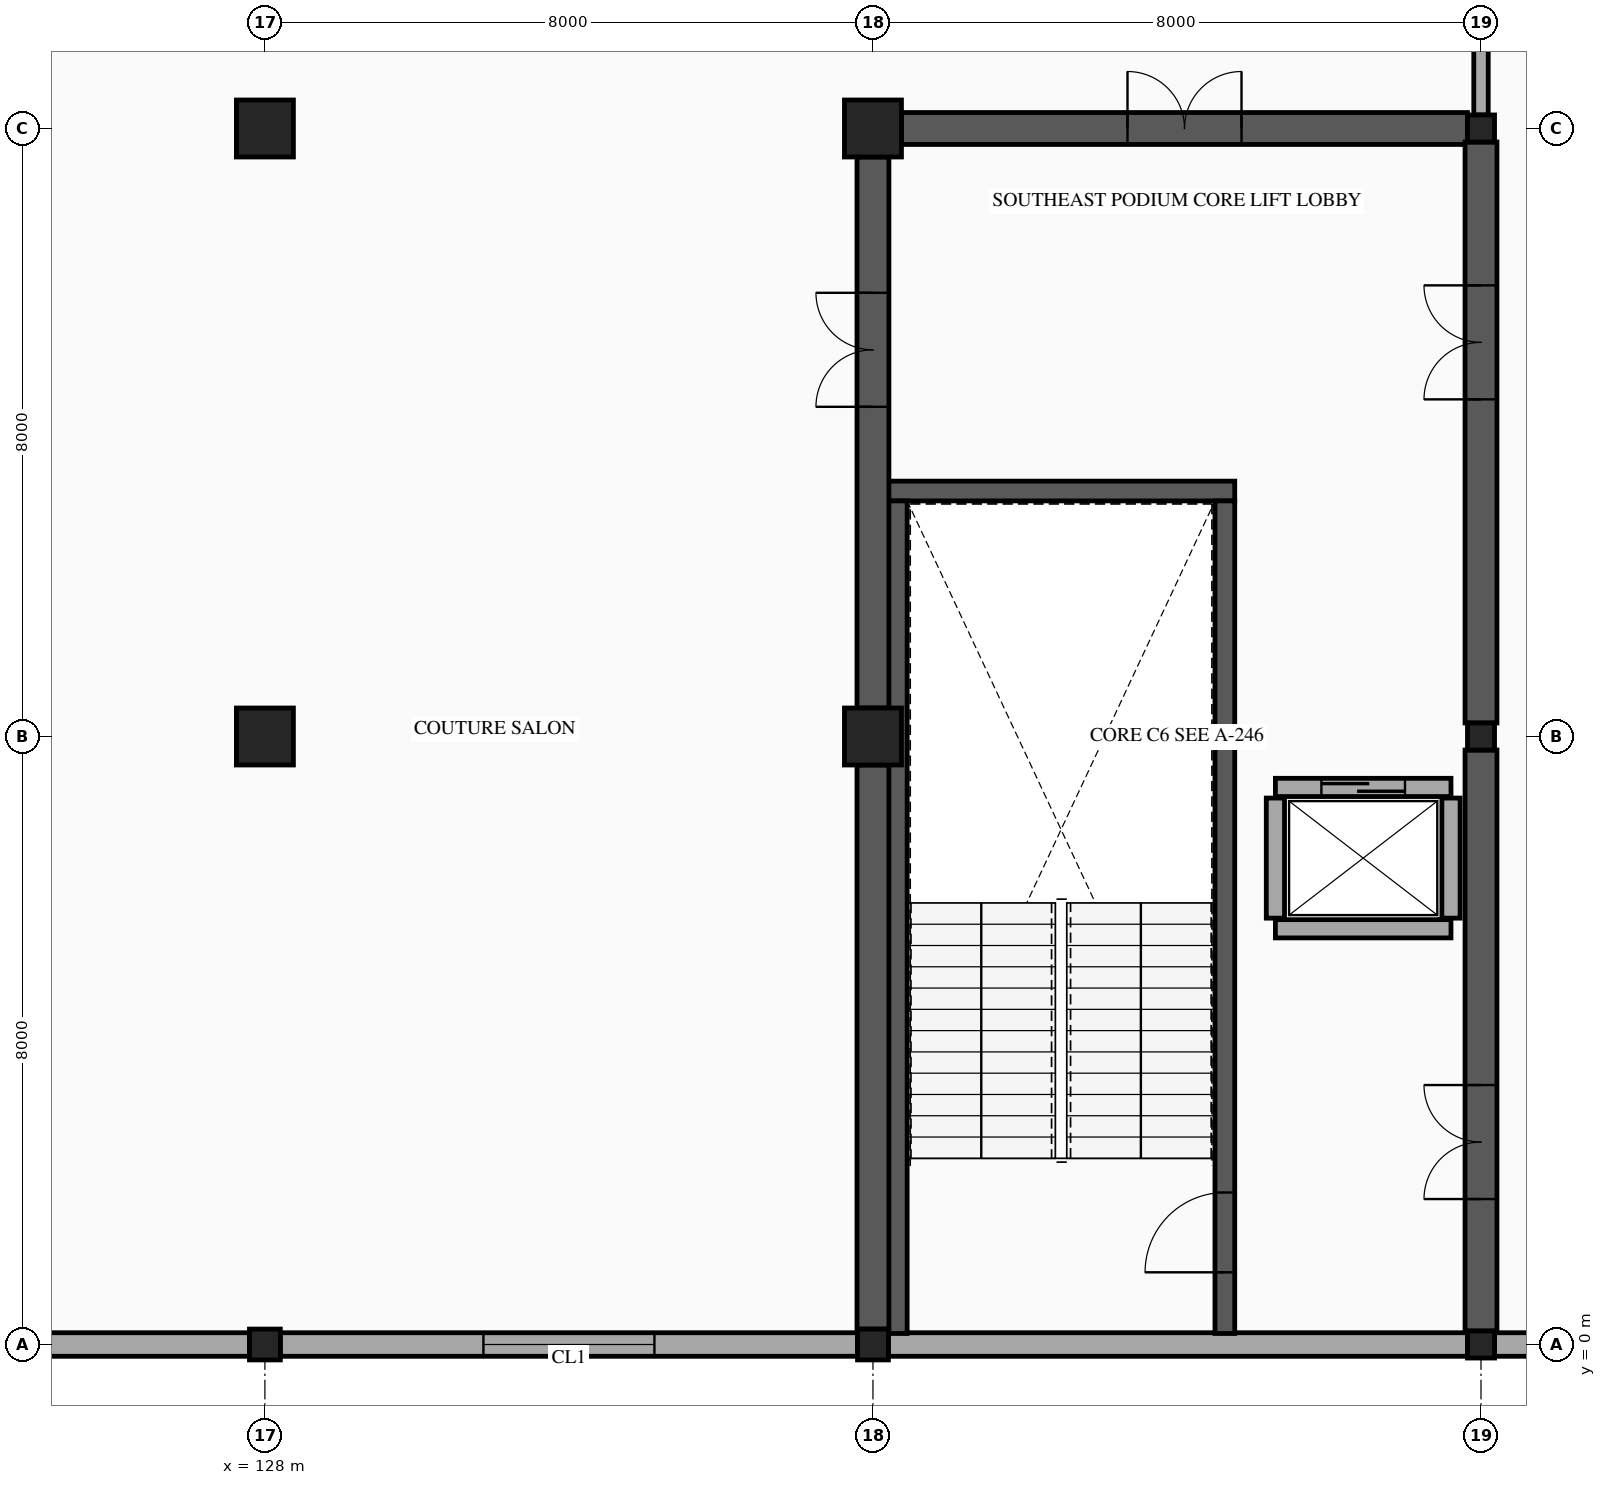
"""IFC4 building model, lengths in metres.
Left out: names, types, materials, properties, quantities, classifications, styles, units other than length and angle.
Written with IfcOpenShell. Run it as: python <this file> out.ifc"""

import sys

from ifc_helpers import new_model, si_unit, direction, frame, frame_2d, origin, origin_2d, place, context, subcontext, project, spatial, rectangle, hollow_rectangle, extrude, element, fill, save


model = new_model("IFC4")
c1 = context("Model", 3, precision=1e-05, world=origin(), true_north=direction((0.0, 1.0)))
c2 = subcontext(c1, "Body", "Model", "MODEL_VIEW")
j1 = project(units=[si_unit("LENGTHUNIT", "METRE"), si_unit("PLANEANGLEUNIT", "RADIAN")], contexts=[c1])
p1 = place(None, origin())
s1 = spatial("IfcSite", under=j1, at=p1, CompositionType="ELEMENT")
p2 = place(p1, origin())
s2 = spatial("IfcBuilding", under=s1, at=p2, CompositionType="ELEMENT")
p3 = place(p2, frame((0.0, 0.0, 10.4)))
s3 = spatial("IfcBuildingStorey", under=s2, at=p3, CompositionType="ELEMENT", Elevation=10.4)
p4 = place(p3, frame((128.0, 0.0, 0.0), z_axis=(0.0, 0.0, 1.0), x_axis=(1.0, 0.0, 0.0)))
e1 = element("IfcColumn", 1, at=p4, inside=s3, PredefinedType="COLUMN", context=c2, shape_type="SweptSolid", body=[
    extrude(hollow_rectangle(XDim=0.406, YDim=0.406, WallThickness=0.015, InnerFilletRadius=0.015, OuterFilletRadius=0.029, at=origin_2d()), origin(), (0.0, 0.0, 1.0), 4.5),
])
for number, where, z_axis, x_axis in (
    (2, (128.0, 8.0, 0.0), (0.0, 0.0, 1.0), (1.0, 0.0, 0.0)),
    (3, (128.0, 16.0, 0.0), (0.0, 0.0, 1.0), (1.0, 0.0, 0.0)),
):
    element("IfcColumn", number, at=place(p3, frame(where, z_axis=z_axis, x_axis=x_axis)), inside=s3, PredefinedType="COLUMN", context=c2, shape_type="SweptSolid", body=[
        extrude(rectangle(XDim=0.75, YDim=0.75, at=origin_2d()), origin(), (0.0, 0.0, 1.0), 4.5),
    ])
p5 = place(p3, frame((136.0, 0.0, 0.0), z_axis=(0.0, 0.0, 1.0), x_axis=(1.0, 0.0, 0.0)))
e4 = element("IfcColumn", 4, at=p5, inside=s3, PredefinedType="COLUMN", context=c2, shape_type="SweptSolid", body=[
    extrude(hollow_rectangle(XDim=0.406, YDim=0.406, WallThickness=0.015, InnerFilletRadius=0.015, OuterFilletRadius=0.029, at=origin_2d()), origin(), (0.0, 0.0, 1.0), 4.5),
])
for number, where, z_axis, x_axis in (
    (5, (136.0, 8.0, 0.0), (0.0, 0.0, 1.0), (1.0, 0.0, 0.0)),
    (6, (136.0, 16.0, 0.0), (0.0, 0.0, 1.0), (1.0, 0.0, 0.0)),
):
    element("IfcColumn", number, at=place(p3, frame(where, z_axis=z_axis, x_axis=x_axis)), inside=s3, PredefinedType="COLUMN", context=c2, shape_type="SweptSolid", body=[
        extrude(rectangle(XDim=0.75, YDim=0.75, at=origin_2d()), origin(), (0.0, 0.0, 1.0), 4.5),
    ])
for number, where, z_axis, x_axis in (
    (7, (144.0, 0.0, 0.0), (0.0, 0.0, 1.0), (1.0, 0.0, 0.0)),
    (8, (144.0, 8.0, 0.0), (0.0, 0.0, 1.0), (1.0, 0.0, 0.0)),
    (9, (144.0, 16.0, 0.0), (0.0, 0.0, 1.0), (1.0, 0.0, 0.0)),
):
    element("IfcColumn", number, at=place(p3, frame(where, z_axis=z_axis, x_axis=x_axis)), inside=s3, PredefinedType="COLUMN", context=c2, shape_type="SweptSolid", body=[
        extrude(hollow_rectangle(XDim=0.356, YDim=0.356, WallThickness=0.012, InnerFilletRadius=0.012, OuterFilletRadius=0.024, at=origin_2d()), origin(), (0.0, 0.0, 1.0), 4.5),
    ])
p6 = place(p3, frame((151.822, 0.0, 0.0), z_axis=(0.0, 0.0, 1.0), x_axis=(-1.0, 0.0, 0.0)))
e10 = element("IfcWall", 10, at=p6, inside=s3, PredefinedType="STANDARD", context=c2, shape_type="SweptSolid", body=[
    extrude(rectangle(XDim=7.644, YDim=0.31, at=frame_2d((3.822, 0.0))), origin(), (0.0, 0.0, 1.0), 3.48),
])
p7 = place(p6, frame((2.697, 0.0, 0.8)))
e11 = element("IfcOpeningElement", 11, at=p7, cuts=e10, PredefinedType="OPENING", context=c2, shape_type="SweptSolid", body=[
    extrude(rectangle(XDim=2.25, YDim=1.75, at=frame_2d((1.125, 0.875))), frame((0.0, 0.165, 0.0), z_axis=(0.0, -1.0, 0.0), x_axis=(1.0, 0.0, 0.0)), (0.0, 0.0, 1.0), 0.33),
])
p8 = place(p3, frame((143.822, 0.0, 0.0), z_axis=(0.0, 0.0, 1.0), x_axis=(-1.0, 0.0, 0.0)))
e12 = element("IfcWall", 12, at=p8, inside=s3, PredefinedType="STANDARD", context=c2, shape_type="SweptSolid", body=[
    extrude(rectangle(XDim=7.619, YDim=0.31, at=frame_2d((3.81, 0.0))), origin(), (0.0, 0.0, 1.0), 3.48),
])
p9 = place(p3, frame((135.797, 0.0, 0.0), z_axis=(0.0, 0.0, 1.0), x_axis=(-1.0, 0.0, 0.0)))
e13 = element("IfcWall", 13, at=p9, inside=s3, PredefinedType="STANDARD", context=c2, shape_type="SweptSolid", body=[
    extrude(rectangle(XDim=7.594, YDim=0.31, at=frame_2d((3.797, 0.0))), origin(), (0.0, 0.0, 1.0), 3.48),
])
p10 = place(p9, frame((2.672, 0.0, 0.8)))
e14 = element("IfcOpeningElement", 14, at=p10, cuts=e13, PredefinedType="OPENING", context=c2, shape_type="SweptSolid", body=[
    extrude(rectangle(XDim=2.25, YDim=1.75, at=frame_2d((1.125, 0.875))), frame((0.0, 0.165, 0.0), z_axis=(0.0, -1.0, 0.0), x_axis=(1.0, 0.0, 0.0)), (0.0, 0.0, 1.0), 0.33),
])
p11 = place(p3, frame((127.797, 0.0, 0.0), z_axis=(0.0, 0.0, 1.0), x_axis=(-1.0, 0.0, 0.0)))
e15 = element("IfcWall", 15, at=p11, inside=s3, PredefinedType="STANDARD", context=c2, shape_type="SweptSolid", body=[
    extrude(rectangle(XDim=7.594, YDim=0.31, at=frame_2d((3.797, 0.0))), origin(), (0.0, 0.0, 1.0), 3.48),
])
p12 = place(p3, frame((136.19, 11.23, 0.0), z_axis=(0.0, 0.0, 1.0), x_axis=(1.0, 0.0, 0.0)))
e16 = element("IfcWall", 16, at=p12, inside=s3, PredefinedType="SHEAR", context=c2, shape_type="SweptSolid", body=[
    extrude(rectangle(XDim=4.57, YDim=0.26, at=frame_2d((2.285, 0.0))), origin(), (0.0, 0.0, 1.0), 4.28),
])
p13 = place(p3, frame((136.32, 0.145, 0.0), z_axis=(0.0, 0.0, 1.0), x_axis=(0.0, 1.0, 0.0)))
e17 = element("IfcWall", 17, at=p13, inside=s3, PredefinedType="SHEAR", context=c2, shape_type="SweptSolid", body=[
    extrude(rectangle(XDim=10.955, YDim=0.26, at=frame_2d((5.478, 0.0))), origin(), (0.0, 0.0, 1.0), 4.28),
])
p14 = place(p3, frame((140.63, 0.145, 0.0), z_axis=(0.0, 0.0, 1.0), x_axis=(0.0, 1.0, 0.0)))
e18 = element("IfcWall", 18, at=p14, inside=s3, PredefinedType="SHEAR", context=c2, shape_type="SweptSolid", body=[
    extrude(rectangle(XDim=10.955, YDim=0.26, at=frame_2d((5.478, 0.0))), origin(), (0.0, 0.0, 1.0), 4.28),
])
p15 = place(p14, frame((0.805, 0.0, 0.0)))
e19 = element("IfcOpeningElement", 19, at=p15, cuts=e18, PredefinedType="OPENING", context=c2, shape_type="SweptSolid", body=[
    extrude(rectangle(XDim=1.05, YDim=2.15, at=frame_2d((0.525, 1.075))), frame((0.0, 0.14, 0.0), z_axis=(0.0, -1.0, 0.0), x_axis=(1.0, 0.0, 0.0)), (0.0, 0.0, 1.0), 0.28),
])
p16 = place(p3, frame((136.375, 16.0, 0.0), z_axis=(0.0, 0.0, 1.0), x_axis=(1.0, 0.0, 0.0)))
e20 = element("IfcWall", 20, at=p16, inside=s3, PredefinedType="SHEAR", context=c2, shape_type="SweptSolid", body=[
    extrude(rectangle(XDim=7.447, YDim=0.42, at=frame_2d((3.724, 0.0))), origin(), (0.0, 0.0, 1.0), 4.28),
])
p17 = place(p16, frame((2.974, 0.0, 0.0)))
e21 = element("IfcOpeningElement", 21, at=p17, cuts=e20, PredefinedType="OPENING", context=c2, shape_type="SweptSolid", body=[
    extrude(rectangle(XDim=1.5, YDim=2.15, at=frame_2d((0.75, 1.075))), frame((0.0, 0.22, 0.0), z_axis=(0.0, -1.0, 0.0), x_axis=(1.0, 0.0, 0.0)), (0.0, 0.0, 1.0), 0.44),
])
p18 = place(p3, frame((136.0, 0.203, 0.0), z_axis=(0.0, 0.0, 1.0), x_axis=(0.0, 1.0, 0.0)))
e22 = element("IfcWall", 22, at=p18, inside=s3, PredefinedType="SHEAR", context=c2, shape_type="SweptSolid", body=[
    extrude(rectangle(XDim=7.422, YDim=0.42, at=frame_2d((3.711, 0.0))), origin(), (0.0, 0.0, 1.0), 4.28),
])
p19 = place(p3, frame((136.0, 8.375, 0.0), z_axis=(0.0, 0.0, 1.0), x_axis=(0.0, 1.0, 0.0)))
e23 = element("IfcWall", 23, at=p19, inside=s3, PredefinedType="SHEAR", context=c2, shape_type="SweptSolid", body=[
    extrude(rectangle(XDim=7.25, YDim=0.42, at=frame_2d((3.625, 0.0))), origin(), (0.0, 0.0, 1.0), 4.28),
])
p20 = place(p19, frame((3.963, 0.0, 0.0)))
e24 = element("IfcOpeningElement", 24, at=p20, cuts=e23, PredefinedType="OPENING", context=c2, shape_type="SweptSolid", body=[
    extrude(rectangle(XDim=1.5, YDim=2.15, at=frame_2d((0.75, 1.075))), frame((0.0, 0.22, 0.0), z_axis=(0.0, -1.0, 0.0), x_axis=(1.0, 0.0, 0.0)), (0.0, 0.0, 1.0), 0.44),
])
p21 = place(p3, frame((144.0, 0.178, 0.0), z_axis=(0.0, 0.0, 1.0), x_axis=(0.0, 1.0, 0.0)))
e25 = element("IfcWall", 25, at=p21, inside=s3, PredefinedType="SHEAR", context=c2, shape_type="SweptSolid", body=[
    extrude(rectangle(XDim=7.644, YDim=0.42, at=frame_2d((3.822, 0.0))), origin(), (0.0, 0.0, 1.0), 4.28),
])
p22 = place(p21, frame((1.736, 0.0, 0.0)))
e26 = element("IfcOpeningElement", 26, at=p22, cuts=e25, PredefinedType="OPENING", context=c2, shape_type="SweptSolid", body=[
    extrude(rectangle(XDim=1.5, YDim=2.15, at=frame_2d((0.75, 1.075))), frame((0.0, 0.22, 0.0), z_axis=(0.0, -1.0, 0.0), x_axis=(1.0, 0.0, 0.0)), (0.0, 0.0, 1.0), 0.44),
])
p23 = place(p3, frame((144.0, 8.178, 0.0), z_axis=(0.0, 0.0, 1.0), x_axis=(0.0, 1.0, 0.0)))
e27 = element("IfcWall", 27, at=p23, inside=s3, PredefinedType="SHEAR", context=c2, shape_type="SweptSolid", body=[
    extrude(rectangle(XDim=7.644, YDim=0.42, at=frame_2d((3.822, 0.0))), origin(), (0.0, 0.0, 1.0), 4.28),
])
p24 = place(p23, frame((4.258, 0.0, 0.0)))
e28 = element("IfcOpeningElement", 28, at=p24, cuts=e27, PredefinedType="OPENING", context=c2, shape_type="SweptSolid", body=[
    extrude(rectangle(XDim=1.5, YDim=2.15, at=frame_2d((0.75, 1.075))), frame((0.0, 0.22, 0.0), z_axis=(0.0, -1.0, 0.0), x_axis=(1.0, 0.0, 0.0)), (0.0, 0.0, 1.0), 0.44),
])
p25 = place(p3, frame((141.295, 7.33, 0.0), z_axis=(0.0, 0.0, 1.0), x_axis=(1.0, 0.0, 0.0)))
e29 = element("IfcWall", 29, at=p25, inside=s3, PredefinedType="PARTITIONING", context=c2, shape_type="SweptSolid", body=[
    extrude(rectangle(XDim=2.31, YDim=0.24, at=frame_2d((1.155, 0.0))), origin(), (0.0, 0.0, 1.0), 4.28),
])
p26 = place(p25, frame((0.605, 0.0, 0.0)))
e30 = element("IfcOpeningElement", 30, at=p26, cuts=e29, PredefinedType="OPENING", context=c2, shape_type="SweptSolid", body=[
    extrude(rectangle(XDim=1.1, YDim=2.15, at=frame_2d((0.55, 1.075))), frame((0.0, 0.13, 0.0), z_axis=(0.0, -1.0, 0.0), x_axis=(1.0, 0.0, 0.0)), (0.0, 0.0, 1.0), 0.26),
])
p27 = place(p3, frame((141.295, 5.47, 0.0), z_axis=(0.0, 0.0, 1.0), x_axis=(1.0, 0.0, 0.0)))
e31 = element("IfcWall", 31, at=p27, inside=s3, PredefinedType="PARTITIONING", context=c2, shape_type="SweptSolid", body=[
    extrude(rectangle(XDim=2.31, YDim=0.24, at=frame_2d((1.155, 0.0))), origin(), (0.0, 0.0, 1.0), 4.28),
])
for number, where, z_axis, x_axis in (
    (32, (141.295, 5.61, 0.0), (0.0, 0.0, 1.0), (0.0, 1.0, 0.0)),
    (33, (143.605, 5.61, 0.0), (0.0, 0.0, 1.0), (0.0, 1.0, 0.0)),
):
    element("IfcWall", number, at=place(p3, frame(where, z_axis=z_axis, x_axis=x_axis)), inside=s3, PredefinedType="PARTITIONING", context=c2, shape_type="SweptSolid", body=[
        extrude(rectangle(XDim=1.58, YDim=0.24, at=frame_2d((0.79, 0.0))), origin(), (0.0, 0.0, 1.0), 4.28),
    ])
p28 = place(p3, frame((144.0, 16.178, 0.0), z_axis=(0.0, 0.0, 1.0), x_axis=(0.0, 1.0, 0.0)))
e34 = element("IfcWall", 34, at=p28, inside=s3, PredefinedType="PARTITIONING", context=c2, shape_type="SweptSolid", body=[
    extrude(rectangle(XDim=15.672, YDim=0.19, at=frame_2d((7.836, 0.0))), origin(), (0.0, 0.0, 1.0), 3.48),
])
p29 = place(p28, frame((10.828, 0.0, 0.0)))
e35 = element("IfcOpeningElement", 35, at=p29, cuts=e34, PredefinedType="OPENING", context=c2, shape_type="SweptSolid", body=[
    extrude(rectangle(XDim=1.8, YDim=2.25, at=frame_2d((0.9, 1.125))), frame((0.0, 0.105, 0.0), z_axis=(0.0, -1.0, 0.0), x_axis=(1.0, 0.0, 0.0)), (0.0, 0.0, 1.0), 0.21),
])
p30 = place(p10, origin())
e36 = element("IfcWindow", 36, at=p30, inside=s3, PartitioningType="DOUBLE_PANEL_VERTICAL", PredefinedType="WINDOW", context=c2, shape_type="SweptSolid", body=[
    extrude(rectangle(XDim=2.25, YDim=1.75, at=frame_2d((1.125, 0.875))), frame((0.0, 0.03, 0.0), z_axis=(0.0, -1.0, 0.0), x_axis=(1.0, 0.0, 0.0)), (0.0, 0.0, 1.0), 0.06),
])
fill(e14, e36)
p31 = place(p15, origin())
e37 = element("IfcDoor", 37, at=p31, inside=s3, OperationType="SINGLE_SWING_LEFT", PredefinedType="DOOR", context=c2, shape_type="SweptSolid", body=[
    extrude(rectangle(XDim=1.05, YDim=2.15, at=frame_2d((0.525, 1.075))), frame((0.0, 0.025, 0.0), z_axis=(0.0, -1.0, 0.0), x_axis=(1.0, 0.0, 0.0)), (0.0, 0.0, 1.0), 0.05),
])
fill(e19, e37)
p32 = place(p17, origin())
e38 = element("IfcDoor", 38, at=p32, inside=s3, OperationType="DOUBLE_DOOR_SINGLE_SWING", PredefinedType="DOOR", context=c2, shape_type="SweptSolid", body=[
    extrude(rectangle(XDim=1.5, YDim=2.15, at=frame_2d((0.75, 1.075))), frame((0.0, 0.025, 0.0), z_axis=(0.0, -1.0, 0.0), x_axis=(1.0, 0.0, 0.0)), (0.0, 0.0, 1.0), 0.05),
])
fill(e21, e38)
p33 = place(p20, origin())
e39 = element("IfcDoor", 39, at=p33, inside=s3, OperationType="DOUBLE_DOOR_SINGLE_SWING", PredefinedType="DOOR", context=c2, shape_type="SweptSolid", body=[
    extrude(rectangle(XDim=1.5, YDim=2.15, at=frame_2d((0.75, 1.075))), frame((0.0, 0.025, 0.0), z_axis=(0.0, -1.0, 0.0), x_axis=(1.0, 0.0, 0.0)), (0.0, 0.0, 1.0), 0.05),
])
fill(e24, e39)
p34 = place(p22, origin())
e40 = element("IfcDoor", 40, at=p34, inside=s3, OperationType="DOUBLE_DOOR_SINGLE_SWING", PredefinedType="DOOR", context=c2, shape_type="SweptSolid", body=[
    extrude(rectangle(XDim=1.5, YDim=2.15, at=frame_2d((0.75, 1.075))), frame((0.0, 0.025, 0.0), z_axis=(0.0, -1.0, 0.0), x_axis=(1.0, 0.0, 0.0)), (0.0, 0.0, 1.0), 0.05),
])
fill(e26, e40)
p35 = place(p24, origin())
e41 = element("IfcDoor", 41, at=p35, inside=s3, OperationType="DOUBLE_DOOR_SINGLE_SWING", PredefinedType="DOOR", context=c2, shape_type="SweptSolid", body=[
    extrude(rectangle(XDim=1.5, YDim=2.15, at=frame_2d((0.75, 1.075))), frame((0.0, 0.025, 0.0), z_axis=(0.0, -1.0, 0.0), x_axis=(1.0, 0.0, 0.0)), (0.0, 0.0, 1.0), 0.05),
])
fill(e28, e41)
p36 = place(p26, origin())
e42 = element("IfcDoor", 42, at=p36, inside=s3, OperationType="SLIDING_TO_LEFT", PredefinedType="DOOR", context=c2, shape_type="SweptSolid", body=[
    extrude(rectangle(XDim=1.1, YDim=2.15, at=frame_2d((0.55, 1.075))), frame((0.0, 0.025, 0.0), z_axis=(0.0, -1.0, 0.0), x_axis=(1.0, 0.0, 0.0)), (0.0, 0.0, 1.0), 0.05),
])
fill(e30, e42)
save(model, sys.argv[1])
